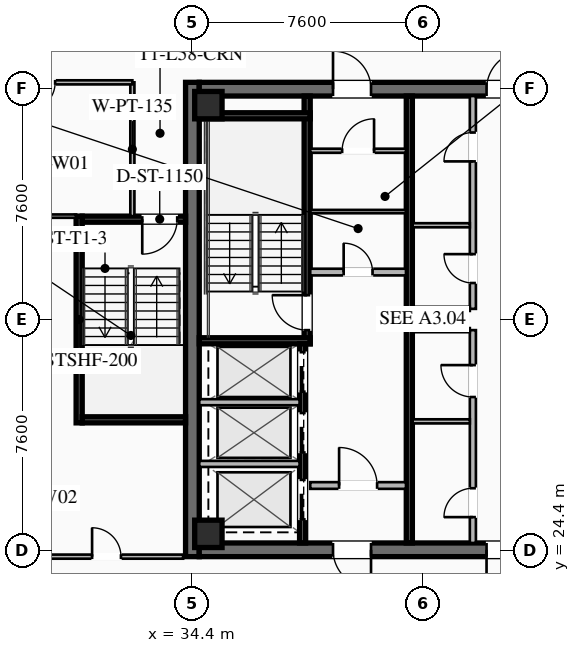
"""IFC4 building model, lengths in metres.
Left out: names, types, materials, properties, quantities, classifications, styles, units other than length and angle.
Written with IfcOpenShell. Run it as: python <this file> out.ifc"""

import sys

from ifc_helpers import new_model, si_unit, direction, frame, frame_2d, origin, origin_2d, place, context, subcontext, project, spatial, rectangle, hollow_rectangle, extrude, element, fill, save


model = new_model("IFC4")
c1 = context("Model", 3, precision=1e-05, world=origin(), true_north=direction((0.0, 1.0)))
c2 = subcontext(c1, "Body", "Model", "MODEL_VIEW")
j1 = project(units=[si_unit("LENGTHUNIT", "METRE"), si_unit("PLANEANGLEUNIT", "RADIAN")], contexts=[c1])
p1 = place(None, origin())
s1 = spatial("IfcSite", under=j1, at=p1, CompositionType="ELEMENT")
p2 = place(p1, origin())
s2 = spatial("IfcBuilding", under=s1, at=p2, CompositionType="ELEMENT")
p3 = place(p2, frame((0.0, 0.0, 214.85)))
s3 = spatial("IfcBuildingStorey", under=s2, at=p3, CompositionType="ELEMENT", Elevation=214.85)
p4 = place(p3, frame((34.425, 24.2, 0.0), z_axis=(0.0, 0.0, 1.0), x_axis=(0.0, 1.0, 0.0)))
e1 = element("IfcWall", 1, at=p4, inside=s3, PredefinedType="SHEAR", context=c2, shape_type="SweptSolid", body=[
    extrude(rectangle(XDim=15.6, YDim=0.45, at=frame_2d((7.8, 0.0))), origin(), (0.0, 0.0, 1.0), 3.55),
])
p5 = place(p3, frame((49.35, 24.425, 0.0), z_axis=(0.0, 0.0, 1.0), x_axis=(-1.0, 0.0, 0.0)))
e2 = element("IfcWall", 2, at=p5, inside=s3, PredefinedType="SHEAR", context=c2, shape_type="SweptSolid", body=[
    extrude(rectangle(XDim=14.7, YDim=0.45, at=frame_2d((7.35, 0.0))), origin(), (0.0, 0.0, 1.0), 3.55),
])
p6 = place(p5, frame((9.05, 0.0, 0.0)))
e3 = element("IfcOpeningElement", 3, at=p6, cuts=e2, PredefinedType="OPENING", context=c2, shape_type="SweptSolid", body=[
    extrude(rectangle(XDim=1.25, YDim=2.25, at=frame_2d((0.625, 1.125))), frame((0.0, 0.235, 0.0), z_axis=(0.0, -1.0, 0.0), x_axis=(1.0, 0.0, 0.0)), (0.0, 0.0, 1.0), 0.47),
])
p7 = place(p5, frame((4.0, 0.0, 0.0)))
e4 = element("IfcOpeningElement", 4, at=p7, cuts=e2, PredefinedType="OPENING", context=c2, shape_type="SweptSolid", body=[
    extrude(rectangle(XDim=1.25, YDim=2.25, at=frame_2d((0.625, 1.125))), frame((0.0, 0.235, 0.0), z_axis=(0.0, -1.0, 0.0), x_axis=(1.0, 0.0, 0.0)), (0.0, 0.0, 1.0), 0.47),
])
p8 = place(p3, frame((34.65, 39.575, 0.0), z_axis=(0.0, 0.0, 1.0), x_axis=(1.0, 0.0, 0.0)))
e5 = element("IfcWall", 5, at=p8, inside=s3, PredefinedType="SHEAR", context=c2, shape_type="SweptSolid", body=[
    extrude(rectangle(XDim=14.7, YDim=0.45, at=frame_2d((7.35, 0.0))), origin(), (0.0, 0.0, 1.0), 3.55),
])
p9 = place(p8, frame((4.4, 0.0, 0.0)))
e6 = element("IfcOpeningElement", 6, at=p9, cuts=e5, PredefinedType="OPENING", context=c2, shape_type="SweptSolid", body=[
    extrude(rectangle(XDim=1.25, YDim=2.25, at=frame_2d((0.625, 1.125))), frame((0.0, 0.235, 0.0), z_axis=(0.0, -1.0, 0.0), x_axis=(1.0, 0.0, 0.0)), (0.0, 0.0, 1.0), 0.47),
])
p10 = place(p8, frame((9.45, 0.0, 0.0)))
e7 = element("IfcOpeningElement", 7, at=p10, cuts=e5, PredefinedType="OPENING", context=c2, shape_type="SweptSolid", body=[
    extrude(rectangle(XDim=1.25, YDim=2.25, at=frame_2d((0.625, 1.125))), frame((0.0, 0.235, 0.0), z_axis=(0.0, -1.0, 0.0), x_axis=(1.0, 0.0, 0.0)), (0.0, 0.0, 1.0), 0.47),
])
for number, where, z_axis, x_axis in (
    (8, (34.95, 24.95, 0.0), (0.0, 0.0, 1.0), (1.0, 0.0, 0.0)),
    (9, (34.95, 39.05, 0.0), (0.0, 0.0, 1.0), (1.0, 0.0, 0.0)),
):
    element("IfcColumn", number, at=place(p3, frame(where, z_axis=z_axis, x_axis=x_axis)), inside=s3, PredefinedType="COLUMN", context=c2, shape_type="SweptSolid", body=[
        extrude(hollow_rectangle(XDim=0.9, YDim=0.9, WallThickness=0.04, at=origin_2d()), origin(), (0.0, 0.0, 1.0), 3.37),
    ])
p11 = place(p3, frame((38.2, 31.2, 0.0), z_axis=(0.0, 0.0, 1.0), x_axis=(0.0, 1.0, 0.0)))
e10 = element("IfcWall", 10, at=p11, inside=s3, PredefinedType="SHEAR", context=c2, shape_type="SweptSolid", body=[
    extrude(rectangle(XDim=8.15, YDim=0.2, at=frame_2d((4.075, 0.0))), origin(), (0.0, 0.0, 1.0), 3.37),
])
p12 = place(p11, frame((0.45, 0.0, 0.0)))
e11 = element("IfcOpeningElement", 11, at=p12, cuts=e10, PredefinedType="OPENING", context=c2, shape_type="SweptSolid", body=[
    extrude(rectangle(XDim=1.15, YDim=2.2, at=frame_2d((0.575, 1.1))), frame((0.0, 0.11, 0.0), z_axis=(0.0, -1.0, 0.0), x_axis=(1.0, 0.0, 0.0)), (0.0, 0.0, 1.0), 0.22),
])
for number, where, z_axis, x_axis in (
    (12, (34.65, 31.3, 0.0), (0.0, 0.0, 1.0), (1.0, 0.0, 0.0)),
    (13, (34.65, 38.7, 0.0), (0.0, 0.0, 1.0), (1.0, 0.0, 0.0)),
):
    element("IfcWall", number, at=place(p3, frame(where, z_axis=z_axis, x_axis=x_axis)), inside=s3, PredefinedType="SHEAR", context=c2, shape_type="SweptSolid", body=[
        extrude(rectangle(XDim=3.65, YDim=0.2, at=frame_2d((1.825, 0.0))), origin(), (0.0, 0.0, 1.0), 3.37),
    ])
p13 = place(p3, frame((41.56, 24.65, 0.0), z_axis=(0.0, 0.0, 1.0), x_axis=(0.0, 1.0, 0.0)))
e14 = element("IfcWall", 14, at=p13, inside=s3, PredefinedType="SHEAR", context=c2, shape_type="SweptSolid", body=[
    extrude(rectangle(XDim=14.7, YDim=0.2, at=frame_2d((7.35, 0.0))), origin(), (0.0, 0.0, 1.0), 3.37),
])
p14 = place(p3, frame((38.3, 33.56, 0.0), z_axis=(0.0, 0.0, 1.0), x_axis=(1.0, 0.0, 0.0)))
e15 = element("IfcWall", 15, at=p14, inside=s3, PredefinedType="SOLIDWALL", context=c2, shape_type="SweptSolid", body=[
    extrude(rectangle(XDim=3.15, YDim=0.22, at=frame_2d((1.575, 0.0))), origin(), (0.0, 0.0, 1.0), 2.723),
])
p15 = place(p14, frame((1.1, 0.0, 0.0)))
e16 = element("IfcOpeningElement", 16, at=p15, cuts=e15, PredefinedType="OPENING", context=c2, shape_type="SweptSolid", body=[
    extrude(rectangle(XDim=0.95, YDim=2.05, at=frame_2d((0.475, 1.025))), frame((0.0, 0.12, 0.0), z_axis=(0.0, -1.0, 0.0), x_axis=(1.0, 0.0, 0.0)), (0.0, 0.0, 1.0), 0.24),
])
p16 = place(p3, frame((38.3, 26.54, 0.0), z_axis=(0.0, 0.0, 1.0), x_axis=(1.0, 0.0, 0.0)))
e17 = element("IfcWall", 17, at=p16, inside=s3, PredefinedType="SOLIDWALL", context=c2, shape_type="SweptSolid", body=[
    extrude(rectangle(XDim=3.15, YDim=0.22, at=frame_2d((1.575, 0.0))), origin(), (0.0, 0.0, 1.0), 2.723),
])
p17 = place(p16, frame((0.95, 0.0, 0.0)))
e18 = element("IfcOpeningElement", 18, at=p17, cuts=e17, PredefinedType="OPENING", context=c2, shape_type="SweptSolid", body=[
    extrude(rectangle(XDim=1.25, YDim=2.25, at=frame_2d((0.625, 1.125))), frame((0.0, 0.12, 0.0), z_axis=(0.0, -1.0, 0.0), x_axis=(1.0, 0.0, 0.0)), (0.0, 0.0, 1.0), 0.24),
])
p18 = place(p3, frame((38.05, 24.65, 0.0), z_axis=(0.0, 0.0, 1.0), x_axis=(0.0, 1.0, 0.0)))
e19 = element("IfcWall", 19, at=p18, inside=s3, PredefinedType="SHEAR", context=c2, shape_type="SweptSolid", body=[
    extrude(rectangle(XDim=6.55, YDim=0.2, at=frame_2d((3.275, 0.0))), origin(), (0.0, 0.0, 1.0), 3.37),
])
p19 = place(p18, frame((4.975, 0.0, 0.0)))
e20 = element("IfcOpeningElement", 20, at=p19, cuts=e19, PredefinedType="OPENING", context=c2, shape_type="SweptSolid", body=[
    extrude(rectangle(XDim=1.3, YDim=2.25, at=frame_2d((0.65, 1.125))), frame((0.0, 0.11, 0.0), z_axis=(0.0, -1.0, 0.0), x_axis=(1.0, 0.0, 0.0)), (0.0, 0.0, 1.0), 0.22),
])
p20 = place(p18, frame((2.975, 0.0, 0.0)))
e21 = element("IfcOpeningElement", 21, at=p20, cuts=e19, PredefinedType="OPENING", context=c2, shape_type="SweptSolid", body=[
    extrude(rectangle(XDim=1.3, YDim=2.25, at=frame_2d((0.65, 1.125))), frame((0.0, 0.11, 0.0), z_axis=(0.0, -1.0, 0.0), x_axis=(1.0, 0.0, 0.0)), (0.0, 0.0, 1.0), 0.22),
])
p21 = place(p18, frame((0.775, 0.0, 0.0)))
e22 = element("IfcOpeningElement", 22, at=p21, cuts=e19, PredefinedType="OPENING", context=c2, shape_type="SweptSolid", body=[
    extrude(rectangle(XDim=1.3, YDim=2.25, at=frame_2d((0.65, 1.125))), frame((0.0, 0.11, 0.0), z_axis=(0.0, -1.0, 0.0), x_axis=(1.0, 0.0, 0.0)), (0.0, 0.0, 1.0), 0.22),
])
for number, where, z_axis, x_axis in (
    (23, (34.65, 27.25, 0.0), (0.0, 0.0, 1.0), (1.0, 0.0, 0.0)),
    (24, (34.65, 29.28, 0.0), (0.0, 0.0, 1.0), (1.0, 0.0, 0.0)),
):
    element("IfcWall", number, at=place(p3, frame(where, z_axis=z_axis, x_axis=x_axis)), inside=s3, PredefinedType="SOLIDWALL", context=c2, shape_type="SweptSolid", body=[
        extrude(rectangle(XDim=3.3, YDim=0.2, at=frame_2d((1.65, 0.0))), origin(), (0.0, 0.0, 1.0), 3.37),
    ])
p22 = place(p3, frame((38.3, 37.55, 0.0), z_axis=(0.0, 0.0, 1.0), x_axis=(1.0, 0.0, 0.0)))
e25 = element("IfcWall", 25, at=p22, inside=s3, PredefinedType="PARTITIONING", context=c2, shape_type="SweptSolid", body=[
    extrude(rectangle(XDim=3.15, YDim=0.135, at=frame_2d((1.575, 0.0))), origin(), (0.0, 0.0, 1.0), 2.723),
])
p23 = place(p22, frame((1.05, 0.0, 0.0)))
e26 = element("IfcOpeningElement", 26, at=p23, cuts=e25, PredefinedType="OPENING", context=c2, shape_type="SweptSolid", body=[
    extrude(rectangle(XDim=1.05, YDim=2.2, at=frame_2d((0.525, 1.1))), frame((0.0, 0.077, 0.0), z_axis=(0.0, -1.0, 0.0), x_axis=(1.0, 0.0, 0.0)), (0.0, 0.0, 1.0), 0.155),
])
p24 = place(p3, frame((38.3, 35.55, 0.0), z_axis=(0.0, 0.0, 1.0), x_axis=(1.0, 0.0, 0.0)))
e27 = element("IfcWall", 27, at=p24, inside=s3, PredefinedType="PARTITIONING", context=c2, shape_type="SweptSolid", body=[
    extrude(rectangle(XDim=3.15, YDim=0.11, at=frame_2d((1.575, 0.0))), origin(), (0.0, 0.0, 1.0), 2.723),
])
p25 = place(p3, frame((43.65, 24.65, 0.0), z_axis=(0.0, 0.0, 1.0), x_axis=(0.0, 1.0, 0.0)))
e28 = element("IfcWall", 28, at=p25, inside=s3, PredefinedType="SOLIDWALL", context=c2, shape_type="SweptSolid", body=[
    extrude(rectangle(XDim=7.0, YDim=0.2, at=frame_2d((3.5, 0.0))), origin(), (0.0, 0.0, 1.0), 2.723),
])
p26 = place(p25, frame((0.85, 0.0, 0.0)))
e29 = element("IfcOpeningElement", 29, at=p26, cuts=e28, PredefinedType="OPENING", context=c2, shape_type="SweptSolid", body=[
    extrude(rectangle(XDim=0.95, YDim=2.05, at=frame_2d((0.475, 1.025))), frame((0.0, 0.11, 0.0), z_axis=(0.0, -1.0, 0.0), x_axis=(1.0, 0.0, 0.0)), (0.0, 0.0, 1.0), 0.22),
])
p27 = place(p25, frame((4.8, 0.0, 0.0)))
e30 = element("IfcOpeningElement", 30, at=p27, cuts=e28, PredefinedType="OPENING", context=c2, shape_type="SweptSolid", body=[
    extrude(rectangle(XDim=1.05, YDim=2.2, at=frame_2d((0.525, 1.1))), frame((0.0, 0.11, 0.0), z_axis=(0.0, -1.0, 0.0), x_axis=(1.0, 0.0, 0.0)), (0.0, 0.0, 1.0), 0.22),
])
for number, where, z_axis, x_axis in (
    (31, (41.67, 31.65, 0.0), (0.0, 0.0, 1.0), (1.0, 0.0, 0.0)),
    (32, (41.67, 28.65, 0.0), (0.0, 0.0, 1.0), (1.0, 0.0, 0.0)),
):
    element("IfcWall", number, at=place(p3, frame(where, z_axis=z_axis, x_axis=x_axis)), inside=s3, PredefinedType="PARTITIONING", context=c2, shape_type="SweptSolid", body=[
        extrude(rectangle(XDim=1.88, YDim=0.135, at=frame_2d((0.94, 0.0))), origin(), (0.0, 0.0, 1.0), 2.723),
    ])
p28 = place(p3, frame((43.65, 32.35, 0.0), z_axis=(0.0, 0.0, 1.0), x_axis=(0.0, 1.0, 0.0)))
e33 = element("IfcWall", 33, at=p28, inside=s3, PredefinedType="SOLIDWALL", context=c2, shape_type="SweptSolid", body=[
    extrude(rectangle(XDim=7.0, YDim=0.2, at=frame_2d((3.5, 0.0))), origin(), (0.0, 0.0, 1.0), 2.723),
])
p29 = place(p28, frame((0.85, 0.0, 0.0)))
e34 = element("IfcOpeningElement", 34, at=p29, cuts=e33, PredefinedType="OPENING", context=c2, shape_type="SweptSolid", body=[
    extrude(rectangle(XDim=0.95, YDim=2.05, at=frame_2d((0.475, 1.025))), frame((0.0, 0.11, 0.0), z_axis=(0.0, -1.0, 0.0), x_axis=(1.0, 0.0, 0.0)), (0.0, 0.0, 1.0), 0.22),
])
p30 = place(p28, frame((4.85, 0.0, 0.0)))
e35 = element("IfcOpeningElement", 35, at=p30, cuts=e33, PredefinedType="OPENING", context=c2, shape_type="SweptSolid", body=[
    extrude(rectangle(XDim=0.95, YDim=2.05, at=frame_2d((0.475, 1.025))), frame((0.0, 0.11, 0.0), z_axis=(0.0, -1.0, 0.0), x_axis=(1.0, 0.0, 0.0)), (0.0, 0.0, 1.0), 0.22),
])
for number, where, z_axis, x_axis in (
    (36, (41.67, 32.35, 0.0), (0.0, 0.0, 1.0), (1.0, 0.0, 0.0)),
    (37, (41.67, 35.1, 0.0), (0.0, 0.0, 1.0), (1.0, 0.0, 0.0)),
):
    element("IfcWall", number, at=place(p3, frame(where, z_axis=z_axis, x_axis=x_axis)), inside=s3, PredefinedType="PARTITIONING", context=c2, shape_type="SweptSolid", body=[
        extrude(rectangle(XDim=1.88, YDim=0.135, at=frame_2d((0.94, 0.0))), origin(), (0.0, 0.0, 1.0), 2.723),
    ])
p31 = place(p3, frame((30.7, 28.6, 0.0), z_axis=(0.0, 0.0, 1.0), x_axis=(0.0, 1.0, 0.0)))
e38 = element("IfcWall", 38, at=p31, inside=s3, PredefinedType="SHEAR", context=c2, shape_type="SweptSolid", body=[
    extrude(rectangle(XDim=6.8, YDim=0.2, at=frame_2d((3.4, 0.0))), origin(), (0.0, 0.0, 1.0), 3.37),
])
p32 = place(p3, frame((34.2, 35.3, 0.0), z_axis=(0.0, 0.0, 1.0), x_axis=(-1.0, 0.0, 0.0)))
e39 = element("IfcWall", 39, at=p32, inside=s3, PredefinedType="SHEAR", context=c2, shape_type="SweptSolid", body=[
    extrude(rectangle(XDim=3.4, YDim=0.2, at=frame_2d((1.7, 0.0))), origin(), (0.0, 0.0, 1.0), 3.37),
])
p33 = place(p32, frame((0.275, 0.0, 0.0)))
e40 = element("IfcOpeningElement", 40, at=p33, cuts=e39, PredefinedType="OPENING", context=c2, shape_type="SweptSolid", body=[
    extrude(rectangle(XDim=1.15, YDim=2.2, at=frame_2d((0.575, 1.1))), frame((0.0, 0.11, 0.0), z_axis=(0.0, -1.0, 0.0), x_axis=(1.0, 0.0, 0.0)), (0.0, 0.0, 1.0), 0.22),
])
p34 = place(p3, frame((30.8, 28.7, 0.0), z_axis=(0.0, 0.0, 1.0), x_axis=(1.0, 0.0, 0.0)))
e41 = element("IfcWall", 41, at=p34, inside=s3, PredefinedType="SHEAR", context=c2, shape_type="SweptSolid", body=[
    extrude(rectangle(XDim=3.4, YDim=0.2, at=frame_2d((1.7, 0.0))), origin(), (0.0, 0.0, 1.0), 3.37),
])
p35 = place(p3, frame((32.45, 35.4, 0.0), z_axis=(0.0, 0.0, 1.0), x_axis=(0.0, 1.0, 0.0)))
e42 = element("IfcWall", 42, at=p35, inside=s3, PredefinedType="PARTITIONING", context=c2, shape_type="SweptSolid", body=[
    extrude(rectangle(XDim=4.4, YDim=0.135, at=frame_2d((2.2, 0.0))), origin(), (0.0, 0.0, 1.0), 2.723),
])
p36 = place(p3, frame((32.45, 39.8, 0.0), z_axis=(0.0, 0.0, 1.0), x_axis=(-1.0, 0.0, 0.0)))
e43 = element("IfcWall", 43, at=p36, inside=s3, PredefinedType="PARTITIONING", context=c2, shape_type="SweptSolid", body=[
    extrude(rectangle(XDim=6.58, YDim=0.135, at=frame_2d((3.29, 0.0))), origin(), (0.0, 0.0, 1.0), 2.723),
])
p37 = place(p36, frame((2.54, 0.0, 0.0)))
e44 = element("IfcOpeningElement", 44, at=p37, cuts=e43, PredefinedType="OPENING", context=c2, shape_type="SweptSolid", body=[
    extrude(rectangle(XDim=0.95, YDim=2.05, at=frame_2d((0.475, 1.025))), frame((0.0, 0.077, 0.0), z_axis=(0.0, -1.0, 0.0), x_axis=(1.0, 0.0, 0.0)), (0.0, 0.0, 1.0), 0.155),
])
p38 = place(p3, frame((25.87, 24.2, 0.0), z_axis=(0.0, 0.0, 1.0), x_axis=(1.0, 0.0, 0.0)))
e45 = element("IfcWall", 45, at=p38, inside=s3, PredefinedType="PARTITIONING", context=c2, shape_type="SweptSolid", body=[
    extrude(rectangle(XDim=8.25, YDim=0.135, at=frame_2d((4.125, 0.0))), origin(), (0.0, 0.0, 1.0), 2.723),
])
p39 = place(p38, frame((5.255, 0.0, 0.0)))
e46 = element("IfcOpeningElement", 46, at=p39, cuts=e45, PredefinedType="OPENING", context=c2, shape_type="SweptSolid", body=[
    extrude(rectangle(XDim=0.95, YDim=2.05, at=frame_2d((0.475, 1.025))), frame((0.0, 0.077, 0.0), z_axis=(0.0, -1.0, 0.0), x_axis=(1.0, 0.0, 0.0)), (0.0, 0.0, 1.0), 0.155),
])
p40 = place(p3, frame((30.6, 35.4, 0.0), z_axis=(0.0, 0.0, 1.0), x_axis=(-1.0, 0.0, 0.0)))
e47 = element("IfcWall", 47, at=p40, inside=s3, PredefinedType="PARTITIONING", context=c2, shape_type="SweptSolid", body=[
    extrude(rectangle(XDim=4.73, YDim=0.11, at=frame_2d((2.365, 0.0))), origin(), (0.0, 0.0, 1.0), 2.723),
])
p41 = place(p9, origin())
e48 = element("IfcDoor", 48, at=p41, inside=s3, OperationType="SINGLE_SWING_LEFT", PredefinedType="DOOR", context=c2, shape_type="SweptSolid", body=[
    extrude(rectangle(XDim=1.25, YDim=2.25, at=frame_2d((0.625, 1.125))), frame((0.0, 0.025, 0.0), z_axis=(0.0, -1.0, 0.0), x_axis=(1.0, 0.0, 0.0)), (0.0, 0.0, 1.0), 0.05),
])
fill(e6, e48)
p42 = place(p10, origin())
e49 = element("IfcDoor", 49, at=p42, inside=s3, OperationType="SINGLE_SWING_RIGHT", PredefinedType="DOOR", context=c2, shape_type="SweptSolid", body=[
    extrude(rectangle(XDim=1.25, YDim=2.25, at=frame_2d((0.625, 1.125))), frame((0.0, 0.025, 0.0), z_axis=(0.0, -1.0, 0.0), x_axis=(1.0, 0.0, 0.0)), (0.0, 0.0, 1.0), 0.05),
])
fill(e7, e49)
p43 = place(p6, origin())
e50 = element("IfcDoor", 50, at=p43, inside=s3, OperationType="SINGLE_SWING_LEFT", PredefinedType="DOOR", context=c2, shape_type="SweptSolid", body=[
    extrude(rectangle(XDim=1.25, YDim=2.25, at=frame_2d((0.625, 1.125))), frame((0.0, 0.025, 0.0), z_axis=(0.0, -1.0, 0.0), x_axis=(1.0, 0.0, 0.0)), (0.0, 0.0, 1.0), 0.05),
])
fill(e3, e50)
p44 = place(p7, origin())
e51 = element("IfcDoor", 51, at=p44, inside=s3, OperationType="SINGLE_SWING_RIGHT", PredefinedType="DOOR", context=c2, shape_type="SweptSolid", body=[
    extrude(rectangle(XDim=1.25, YDim=2.25, at=frame_2d((0.625, 1.125))), frame((0.0, 0.025, 0.0), z_axis=(0.0, -1.0, 0.0), x_axis=(1.0, 0.0, 0.0)), (0.0, 0.0, 1.0), 0.05),
])
fill(e4, e51)
p45 = place(p12, origin())
e52 = element("IfcDoor", 52, at=p45, inside=s3, OperationType="SINGLE_SWING_RIGHT", PredefinedType="DOOR", context=c2, shape_type="SweptSolid", body=[
    extrude(rectangle(XDim=1.15, YDim=2.2, at=frame_2d((0.575, 1.1))), frame((0.0, 0.025, 0.0), z_axis=(0.0, -1.0, 0.0), x_axis=(1.0, 0.0, 0.0)), (0.0, 0.0, 1.0), 0.05),
])
fill(e11, e52)
p46 = place(p17, origin())
e53 = element("IfcDoor", 53, at=p46, inside=s3, OperationType="SINGLE_SWING_LEFT", PredefinedType="DOOR", context=c2, shape_type="SweptSolid", body=[
    extrude(rectangle(XDim=1.25, YDim=2.25, at=frame_2d((0.625, 1.125))), frame((0.0, 0.025, 0.0), z_axis=(0.0, -1.0, 0.0), x_axis=(1.0, 0.0, 0.0)), (0.0, 0.0, 1.0), 0.05),
])
fill(e18, e53)
p47 = place(p23, origin())
e54 = element("IfcDoor", 54, at=p47, inside=s3, OperationType="SINGLE_SWING_RIGHT", PredefinedType="DOOR", context=c2, shape_type="SweptSolid", body=[
    extrude(rectangle(XDim=1.05, YDim=2.2, at=frame_2d((0.525, 1.1))), frame((0.0, 0.025, 0.0), z_axis=(0.0, -1.0, 0.0), x_axis=(1.0, 0.0, 0.0)), (0.0, 0.0, 1.0), 0.05),
])
fill(e26, e54)
p48 = place(p15, origin())
e55 = element("IfcDoor", 55, at=p48, inside=s3, OperationType="SINGLE_SWING_LEFT", PredefinedType="DOOR", context=c2, shape_type="SweptSolid", body=[
    extrude(rectangle(XDim=0.95, YDim=2.05, at=frame_2d((0.475, 1.025))), frame((0.0, 0.025, 0.0), z_axis=(0.0, -1.0, 0.0), x_axis=(1.0, 0.0, 0.0)), (0.0, 0.0, 1.0), 0.05),
])
fill(e16, e55)
p49 = place(p26, origin())
e56 = element("IfcDoor", 56, at=p49, inside=s3, OperationType="SINGLE_SWING_LEFT", PredefinedType="DOOR", context=c2, shape_type="SweptSolid", body=[
    extrude(rectangle(XDim=0.95, YDim=2.05, at=frame_2d((0.475, 1.025))), frame((0.0, 0.025, 0.0), z_axis=(0.0, -1.0, 0.0), x_axis=(1.0, 0.0, 0.0)), (0.0, 0.0, 1.0), 0.05),
])
fill(e29, e56)
p50 = place(p27, origin())
e57 = element("IfcDoor", 57, at=p50, inside=s3, OperationType="SINGLE_SWING_RIGHT", PredefinedType="DOOR", context=c2, shape_type="SweptSolid", body=[
    extrude(rectangle(XDim=1.05, YDim=2.2, at=frame_2d((0.525, 1.1))), frame((0.0, 0.025, 0.0), z_axis=(0.0, -1.0, 0.0), x_axis=(1.0, 0.0, 0.0)), (0.0, 0.0, 1.0), 0.05),
])
fill(e30, e57)
p51 = place(p29, origin())
e58 = element("IfcDoor", 58, at=p51, inside=s3, OperationType="SINGLE_SWING_RIGHT", PredefinedType="DOOR", context=c2, shape_type="SweptSolid", body=[
    extrude(rectangle(XDim=0.95, YDim=2.05, at=frame_2d((0.475, 1.025))), frame((0.0, 0.025, 0.0), z_axis=(0.0, -1.0, 0.0), x_axis=(1.0, 0.0, 0.0)), (0.0, 0.0, 1.0), 0.05),
])
fill(e34, e58)
p52 = place(p30, origin())
e59 = element("IfcDoor", 59, at=p52, inside=s3, OperationType="SINGLE_SWING_LEFT", PredefinedType="DOOR", context=c2, shape_type="SweptSolid", body=[
    extrude(rectangle(XDim=0.95, YDim=2.05, at=frame_2d((0.475, 1.025))), frame((0.0, 0.025, 0.0), z_axis=(0.0, -1.0, 0.0), x_axis=(1.0, 0.0, 0.0)), (0.0, 0.0, 1.0), 0.05),
])
fill(e35, e59)
p53 = place(p33, origin())
e60 = element("IfcDoor", 60, at=p53, inside=s3, OperationType="SINGLE_SWING_RIGHT", PredefinedType="DOOR", context=c2, shape_type="SweptSolid", body=[
    extrude(rectangle(XDim=1.15, YDim=2.2, at=frame_2d((0.575, 1.1))), frame((0.0, 0.025, 0.0), z_axis=(0.0, -1.0, 0.0), x_axis=(1.0, 0.0, 0.0)), (0.0, 0.0, 1.0), 0.05),
])
fill(e40, e60)
p54 = place(p37, origin())
e61 = element("IfcDoor", 61, at=p54, inside=s3, OperationType="SINGLE_SWING_RIGHT", PredefinedType="DOOR", context=c2, shape_type="SweptSolid", body=[
    extrude(rectangle(XDim=0.95, YDim=2.05, at=frame_2d((0.475, 1.025))), frame((0.0, 0.025, 0.0), z_axis=(0.0, -1.0, 0.0), x_axis=(1.0, 0.0, 0.0)), (0.0, 0.0, 1.0), 0.05),
])
fill(e44, e61)
p55 = place(p39, origin())
e62 = element("IfcDoor", 62, at=p55, inside=s3, OperationType="SINGLE_SWING_LEFT", PredefinedType="DOOR", context=c2, shape_type="SweptSolid", body=[
    extrude(rectangle(XDim=0.95, YDim=2.05, at=frame_2d((0.475, 1.025))), frame((0.0, 0.025, 0.0), z_axis=(0.0, -1.0, 0.0), x_axis=(1.0, 0.0, 0.0)), (0.0, 0.0, 1.0), 0.05),
])
fill(e46, e62)
p56 = place(p19, origin())
e63 = element("IfcDoor", 63, at=p56, inside=s3, OperationType="SLIDING_TO_LEFT", PredefinedType="DOOR", context=c2, shape_type="SweptSolid", body=[
    extrude(rectangle(XDim=1.3, YDim=2.25, at=frame_2d((0.65, 1.125))), frame((0.0, 0.025, 0.0), z_axis=(0.0, -1.0, 0.0), x_axis=(1.0, 0.0, 0.0)), (0.0, 0.0, 1.0), 0.05),
])
fill(e20, e63)
p57 = place(p20, origin())
e64 = element("IfcDoor", 64, at=p57, inside=s3, OperationType="SLIDING_TO_LEFT", PredefinedType="DOOR", context=c2, shape_type="SweptSolid", body=[
    extrude(rectangle(XDim=1.3, YDim=2.25, at=frame_2d((0.65, 1.125))), frame((0.0, 0.025, 0.0), z_axis=(0.0, -1.0, 0.0), x_axis=(1.0, 0.0, 0.0)), (0.0, 0.0, 1.0), 0.05),
])
fill(e21, e64)
p58 = place(p21, origin())
e65 = element("IfcDoor", 65, at=p58, inside=s3, OperationType="SLIDING_TO_LEFT", PredefinedType="DOOR", context=c2, shape_type="SweptSolid", body=[
    extrude(rectangle(XDim=1.3, YDim=2.25, at=frame_2d((0.65, 1.125))), frame((0.0, 0.025, 0.0), z_axis=(0.0, -1.0, 0.0), x_axis=(1.0, 0.0, 0.0)), (0.0, 0.0, 1.0), 0.05),
])
fill(e22, e65)
save(model, sys.argv[1])
